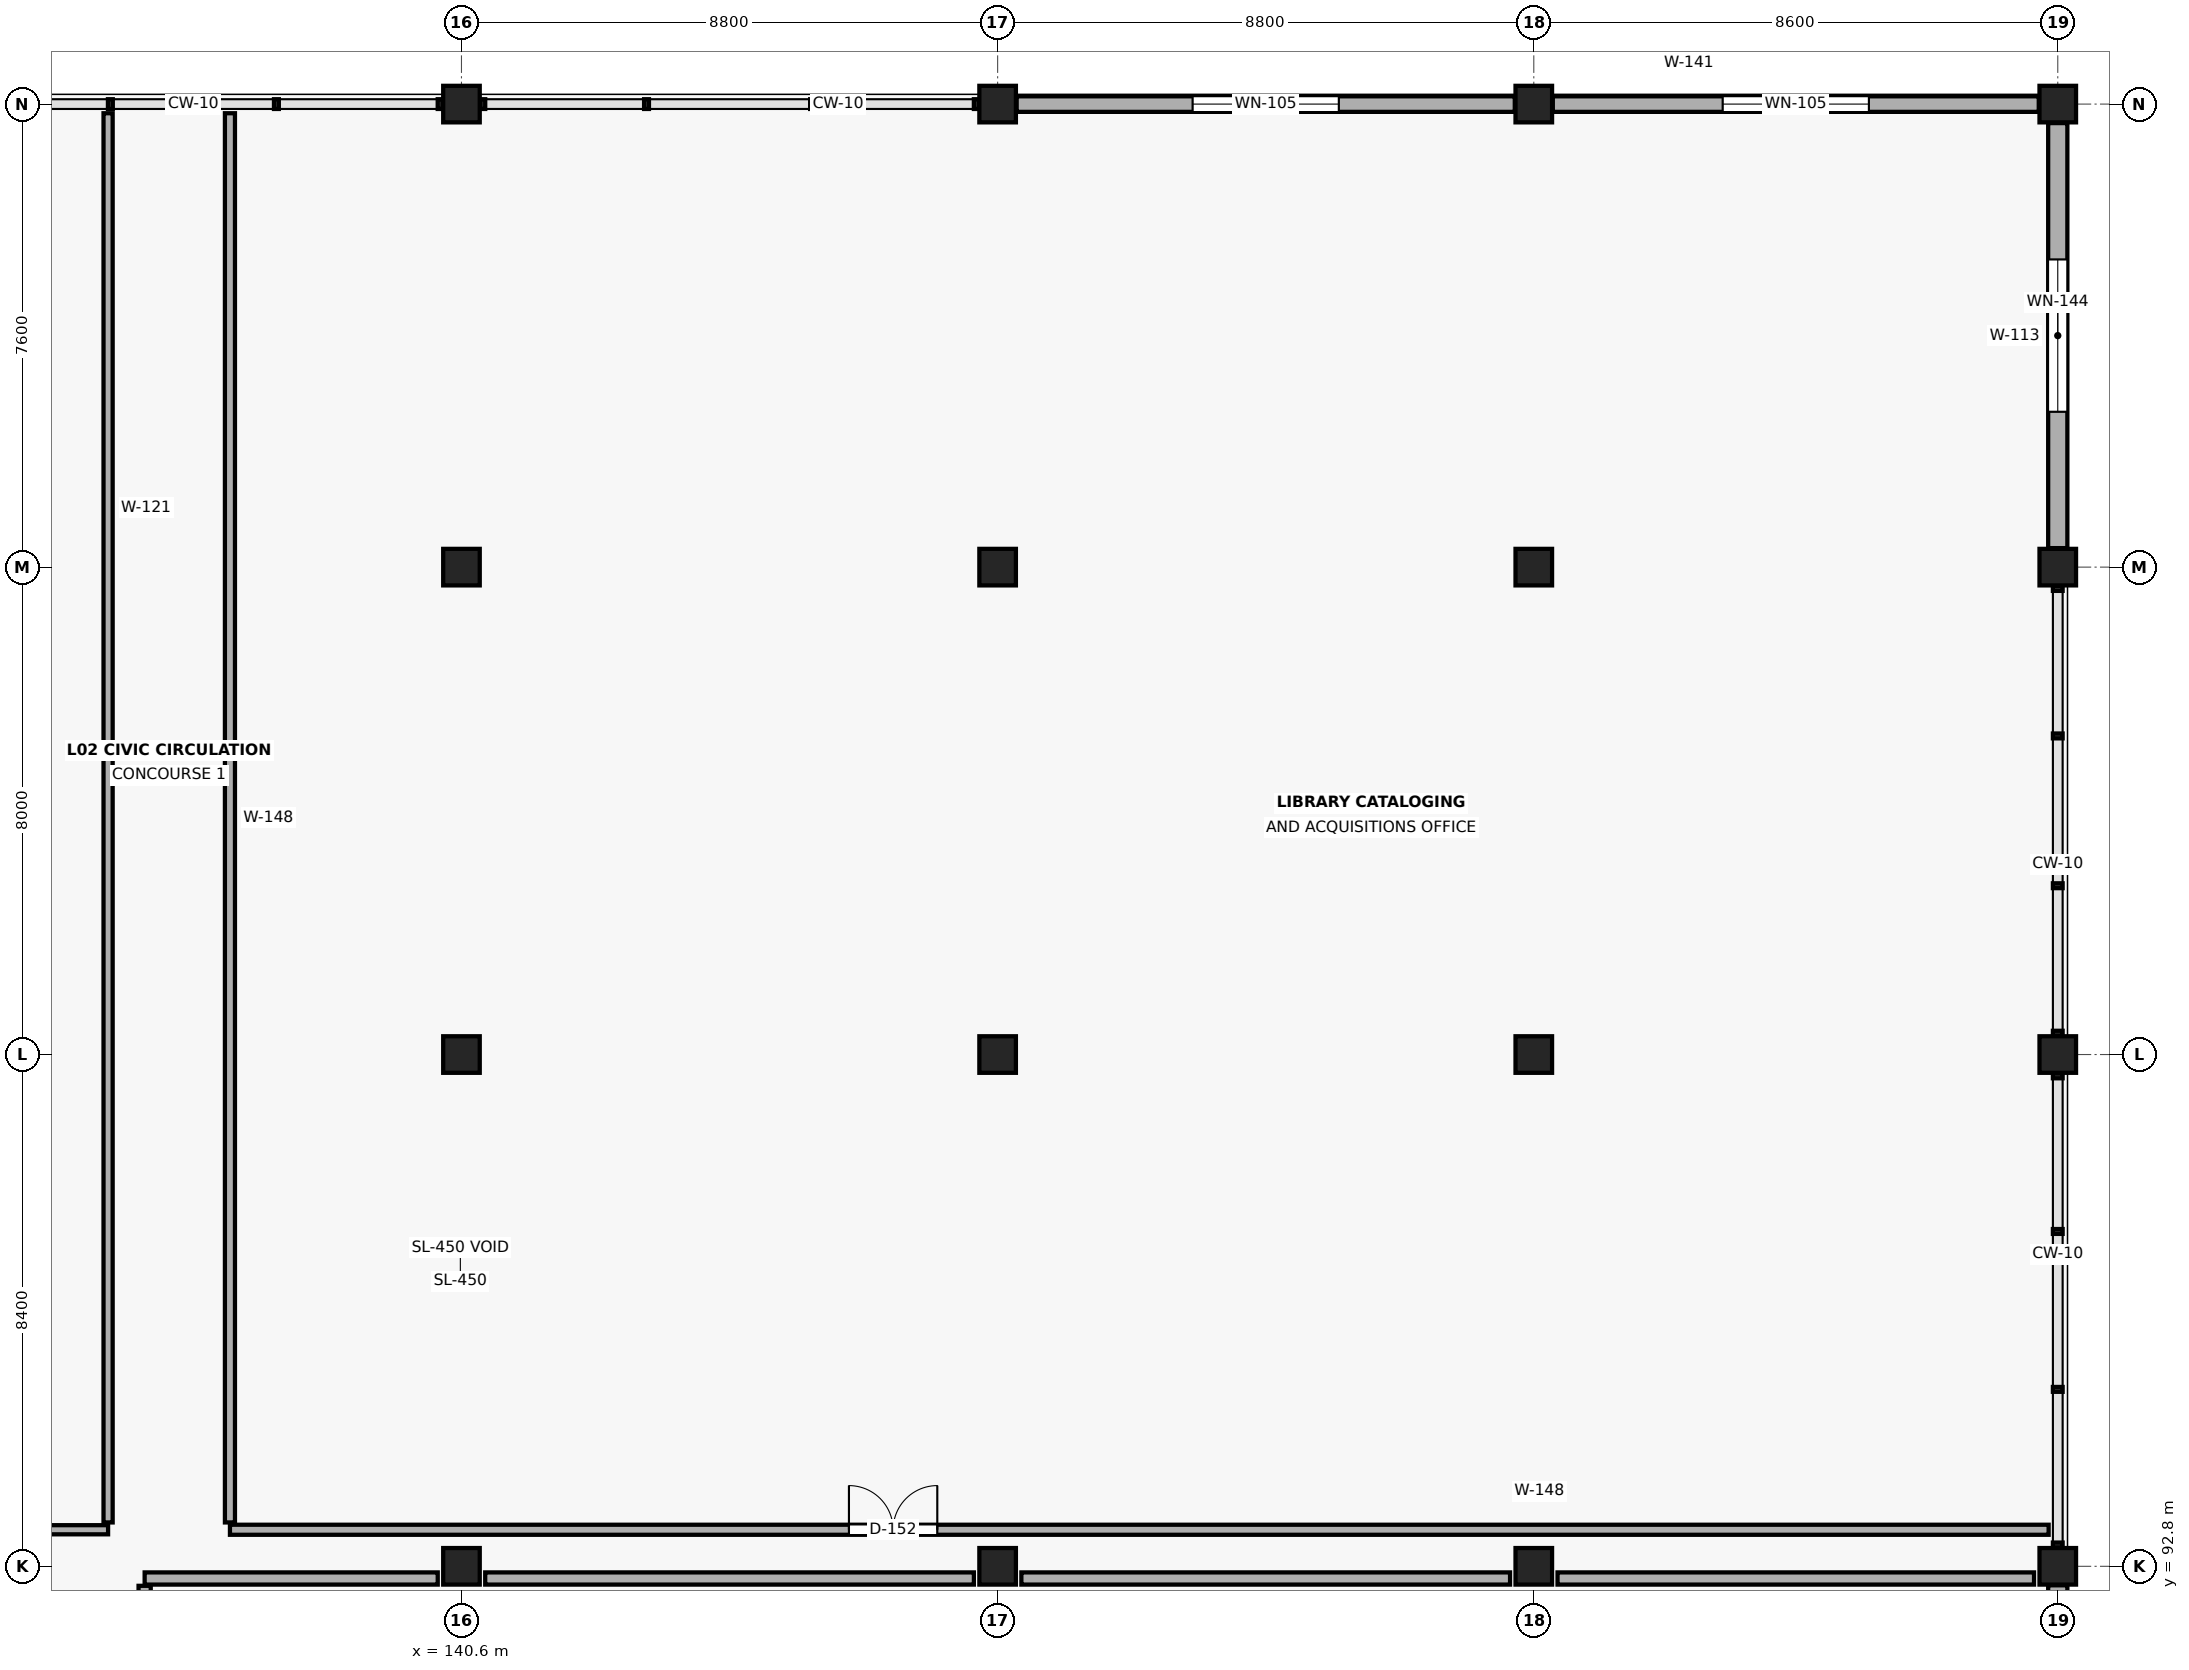
"""IFC4 building model, lengths in metres.
Left out: names, types, materials, properties, quantities, classifications, styles, units other than length and angle.
Written with IfcOpenShell. Run it as: python <this file> out.ifc"""

import sys

from ifc_helpers import new_model, si_unit, direction, frame, frame_2d, origin, origin_2d, place, context, subcontext, project, spatial, rectangle, extrude, element, fill, save


model = new_model("IFC4")
c1 = context("Model", 3, precision=1e-05, world=origin(), true_north=direction((0.0, 1.0)))
c2 = subcontext(c1, "Body", "Model", "MODEL_VIEW")
j1 = project(units=[si_unit("LENGTHUNIT", "METRE"), si_unit("PLANEANGLEUNIT", "RADIAN")], contexts=[c1])
p1 = place(None, origin())
s1 = spatial("IfcSite", under=j1, at=p1, CompositionType="ELEMENT")
p2 = place(p1, origin())
s2 = spatial("IfcBuilding", under=s1, at=p2, CompositionType="ELEMENT")
p3 = place(p2, frame((0.0, 0.0, 9.9)))
s3 = spatial("IfcBuildingStorey", under=s2, at=p3, CompositionType="ELEMENT", Elevation=9.9)
for number, where, z_axis, x_axis in (
    (1, (140.6, 92.8, 0.0), (0.0, 0.0, 1.0), (1.0, 0.0, 0.0)),
    (2, (140.6, 101.2, 0.0), (0.0, 0.0, 1.0), (1.0, 0.0, 0.0)),
    (3, (140.6, 109.2, 0.0), (0.0, 0.0, 1.0), (1.0, 0.0, 0.0)),
    (4, (140.6, 116.8, 0.0), (0.0, 0.0, 1.0), (1.0, 0.0, 0.0)),
    (5, (149.4, 92.8, 0.0), (0.0, 0.0, 1.0), (1.0, 0.0, 0.0)),
    (6, (149.4, 101.2, 0.0), (0.0, 0.0, 1.0), (1.0, 0.0, 0.0)),
    (7, (149.4, 109.2, 0.0), (0.0, 0.0, 1.0), (1.0, 0.0, 0.0)),
    (8, (149.4, 116.8, 0.0), (0.0, 0.0, 1.0), (1.0, 0.0, 0.0)),
    (9, (158.2, 92.8, 0.0), (0.0, 0.0, 1.0), (1.0, 0.0, 0.0)),
    (10, (158.2, 101.2, 0.0), (0.0, 0.0, 1.0), (1.0, 0.0, 0.0)),
    (11, (158.2, 109.2, 0.0), (0.0, 0.0, 1.0), (1.0, 0.0, 0.0)),
    (12, (158.2, 116.8, 0.0), (0.0, 0.0, 1.0), (1.0, 0.0, 0.0)),
    (13, (166.8, 92.8, 0.0), (0.0, 0.0, 1.0), (1.0, 0.0, 0.0)),
    (14, (166.8, 101.2, 0.0), (0.0, 0.0, 1.0), (1.0, 0.0, 0.0)),
    (15, (166.8, 109.2, 0.0), (0.0, 0.0, 1.0), (1.0, 0.0, 0.0)),
    (16, (166.8, 116.8, 0.0), (0.0, 0.0, 1.0), (1.0, 0.0, 0.0)),
):
    element("IfcColumn", number, at=place(p3, frame(where, z_axis=z_axis, x_axis=x_axis)), inside=s3, PredefinedType="COLUMN", context=c2, shape_type="SweptSolid", body=[
        extrude(rectangle(XDim=0.6, YDim=0.6, at=origin_2d()), origin(), (0.0, 0.0, 1.0), 4.5),
    ])
p4 = place(p3, frame((149.712, 116.8, 0.0), z_axis=(0.0, 0.0, 1.0), x_axis=(1.0, 0.0, 0.0)))
e17 = element("IfcWall", 17, at=p4, inside=s3, PredefinedType="SOLIDWALL", context=c2, shape_type="SweptSolid", body=[
    extrude(rectangle(XDim=8.176, YDim=0.255, at=frame_2d((4.088, 0.0))), origin(), (0.0, 0.0, 1.0), 3.395),
])
p5 = place(p4, frame((2.888, 0.0, 0.85)))
e18 = element("IfcOpeningElement", 18, at=p5, cuts=e17, PredefinedType="OPENING", context=c2, shape_type="SweptSolid", body=[
    extrude(rectangle(XDim=2.4, YDim=2.4, at=frame_2d((1.2, 1.2))), frame((0.0, 0.139, 0.0), z_axis=(0.0, -1.0, 0.0), x_axis=(1.0, 0.0, 0.0)), (0.0, 0.0, 1.0), 0.279),
])
p6 = place(p3, frame((158.512, 116.8, 0.0), z_axis=(0.0, 0.0, 1.0), x_axis=(1.0, 0.0, 0.0)))
e19 = element("IfcWall", 19, at=p6, inside=s3, PredefinedType="SOLIDWALL", context=c2, shape_type="SweptSolid", body=[
    extrude(rectangle(XDim=7.976, YDim=0.255, at=frame_2d((3.988, 0.0))), origin(), (0.0, 0.0, 1.0), 3.395),
])
p7 = place(p6, frame((2.788, 0.0, 0.85)))
e20 = element("IfcOpeningElement", 20, at=p7, cuts=e19, PredefinedType="OPENING", context=c2, shape_type="SweptSolid", body=[
    extrude(rectangle(XDim=2.4, YDim=2.4, at=frame_2d((1.2, 1.2))), frame((0.0, 0.139, 0.0), z_axis=(0.0, -1.0, 0.0), x_axis=(1.0, 0.0, 0.0)), (0.0, 0.0, 1.0), 0.279),
])
p8 = place(p3, frame((166.8, 92.488, 0.0), z_axis=(0.0, 0.0, 1.0), x_axis=(0.0, -1.0, 0.0)))
e21 = element("IfcWall", 21, at=p8, inside=s3, PredefinedType="SOLIDWALL", context=c2, shape_type="SweptSolid", body=[
    extrude(rectangle(XDim=8.126, YDim=0.315, at=frame_2d((4.063, 0.0))), origin(), (0.0, 0.0, 1.0), 3.395),
])
p9 = place(p8, frame((2.813, 0.0, 0.85)))
e22 = element("IfcOpeningElement", 22, at=p9, cuts=e21, PredefinedType="OPENING", context=c2, shape_type="SweptSolid", body=[
    extrude(rectangle(XDim=2.5, YDim=2.4, at=frame_2d((1.25, 1.2))), frame((0.0, 0.169, 0.0), z_axis=(0.0, -1.0, 0.0), x_axis=(1.0, 0.0, 0.0)), (0.0, 0.0, 1.0), 0.339),
])
p10 = place(p3, frame((166.8, 116.488, 0.0), z_axis=(0.0, 0.0, 1.0), x_axis=(0.0, -1.0, 0.0)))
e23 = element("IfcWall", 23, at=p10, inside=s3, PredefinedType="SOLIDWALL", context=c2, shape_type="SweptSolid", body=[
    extrude(rectangle(XDim=6.976, YDim=0.315, at=frame_2d((3.488, 0.0))), origin(), (0.0, 0.0, 1.0), 3.395),
])
p11 = place(p10, frame((2.238, 0.0, 0.85)))
e24 = element("IfcOpeningElement", 24, at=p11, cuts=e23, PredefinedType="OPENING", context=c2, shape_type="SweptSolid", body=[
    extrude(rectangle(XDim=2.5, YDim=2.4, at=frame_2d((1.25, 1.2))), frame((0.0, 0.169, 0.0), z_axis=(0.0, -1.0, 0.0), x_axis=(1.0, 0.0, 0.0)), (0.0, 0.0, 1.0), 0.339),
])
p12 = place(p3, frame((166.41, 92.6, 0.0), z_axis=(0.0, 0.0, 1.0), x_axis=(-1.0, 0.0, 0.0)))
e25 = element("IfcWall", 25, at=p12, inside=s3, PredefinedType="STANDARD", context=c2, shape_type="SweptSolid", body=[
    extrude(rectangle(XDim=7.821, YDim=0.2, at=frame_2d((3.91, 0.0))), origin(), (0.0, 0.0, 1.0), 3.455),
])
p13 = place(p3, frame((157.81, 92.6, 0.0), z_axis=(0.0, 0.0, 1.0), x_axis=(-1.0, 0.0, 0.0)))
e26 = element("IfcWall", 26, at=p13, inside=s3, PredefinedType="STANDARD", context=c2, shape_type="SweptSolid", body=[
    extrude(rectangle(XDim=8.021, YDim=0.2, at=frame_2d((4.01, 0.0))), origin(), (0.0, 0.0, 1.0), 3.455),
])
p14 = place(p3, frame((149.01, 92.6, 0.0), z_axis=(0.0, 0.0, 1.0), x_axis=(-1.0, 0.0, 0.0)))
e27 = element("IfcWall", 27, at=p14, inside=s3, PredefinedType="STANDARD", context=c2, shape_type="SweptSolid", body=[
    extrude(rectangle(XDim=8.021, YDim=0.2, at=frame_2d((4.01, 0.0))), origin(), (0.0, 0.0, 1.0), 3.455),
])
p15 = place(p3, frame((140.21, 92.6, 0.0), z_axis=(0.0, 0.0, 1.0), x_axis=(-1.0, 0.0, 0.0)))
e28 = element("IfcWall", 28, at=p15, inside=s3, PredefinedType="STANDARD", context=c2, shape_type="SweptSolid", body=[
    extrude(rectangle(XDim=4.811, YDim=0.2, at=frame_2d((2.405, 0.0))), origin(), (0.0, 0.0, 1.0), 3.455),
])
p16 = place(p3, frame((135.4, 64.72, 0.0), z_axis=(0.0, 0.0, 1.0), x_axis=(0.0, 1.0, 0.0)))
e29 = element("IfcWall", 29, at=p16, inside=s3, PredefinedType="STANDARD", context=c2, shape_type="SweptSolid", body=[
    extrude(rectangle(XDim=27.76, YDim=0.2, at=frame_2d((13.88, 0.0))), origin(), (0.0, 0.0, 1.0), 4.255),
])
p17 = place(p16, frame((9.23, 0.0, 0.0)))
e30 = element("IfcOpeningElement", 30, at=p17, cuts=e29, PredefinedType="OPENING", context=c2, shape_type="SweptSolid", body=[
    extrude(rectangle(XDim=1.6, YDim=2.25, at=frame_2d((0.8, 1.125))), frame((0.0, 0.112, 0.0), z_axis=(0.0, -1.0, 0.0), x_axis=(1.0, 0.0, 0.0)), (0.0, 0.0, 1.0), 0.224),
])
p18 = place(p3, frame((105.2, 93.4, 0.0), z_axis=(0.0, 0.0, 1.0), x_axis=(1.0, 0.0, 0.0)))
e31 = element("IfcWall", 31, at=p18, inside=s3, PredefinedType="PARTITIONING", context=c2, shape_type="SweptSolid", body=[
    extrude(rectangle(XDim=29.6, YDim=0.15, at=frame_2d((14.8, 0.0))), origin(), (0.0, 0.0, 1.0), 4.255),
])
p19 = place(p18, frame((10.41, 0.0, 0.0)))
e32 = element("IfcOpeningElement", 32, at=p19, cuts=e31, PredefinedType="OPENING", context=c2, shape_type="SweptSolid", body=[
    extrude(rectangle(XDim=1.55, YDim=2.35, at=frame_2d((0.775, 1.175))), frame((0.0, 0.087, 0.0), z_axis=(0.0, -1.0, 0.0), x_axis=(1.0, 0.0, 0.0)), (0.0, 0.0, 1.0), 0.174),
])
p20 = place(p3, frame((134.8, 93.52, 0.0), z_axis=(0.0, 0.0, 1.0), x_axis=(0.0, 1.0, 0.0)))
e33 = element("IfcWall", 33, at=p20, inside=s3, PredefinedType="PARTITIONING", context=c2, shape_type="SweptSolid", body=[
    extrude(rectangle(XDim=23.13, YDim=0.15, at=frame_2d((11.565, 0.0))), origin(), (0.0, 0.0, 1.0), 4.255),
])
p21 = place(p3, frame((136.8, 93.4, 0.0), z_axis=(0.0, 0.0, 1.0), x_axis=(1.0, 0.0, 0.0)))
e34 = element("IfcWall", 34, at=p21, inside=s3, PredefinedType="PARTITIONING", context=c2, shape_type="SweptSolid", body=[
    extrude(rectangle(XDim=29.85, YDim=0.165, at=frame_2d((14.925, 0.0))), origin(), (0.0, 0.0, 1.0), 4.255),
])
p22 = place(p21, frame((10.16, 0.0, 0.0)))
e35 = element("IfcOpeningElement", 35, at=p22, cuts=e34, PredefinedType="OPENING", context=c2, shape_type="SweptSolid", body=[
    extrude(rectangle(XDim=1.45, YDim=2.35, at=frame_2d((0.725, 1.175))), frame((0.0, 0.094, 0.0), z_axis=(0.0, -1.0, 0.0), x_axis=(1.0, 0.0, 0.0)), (0.0, 0.0, 1.0), 0.189),
])
p23 = place(p3, frame((136.8, 116.65, 0.0), z_axis=(0.0, 0.0, 1.0), x_axis=(0.0, -1.0, 0.0)))
e36 = element("IfcWall", 36, at=p23, inside=s3, PredefinedType="PARTITIONING", context=c2, shape_type="SweptSolid", body=[
    extrude(rectangle(XDim=23.13, YDim=0.165, at=frame_2d((11.565, 0.0))), origin(), (0.0, 0.0, 1.0), 4.255),
])
p24 = place(p5, origin())
e37 = element("IfcWindow", 37, at=p24, inside=s3, PartitioningType="SINGLE_PANEL", PredefinedType="WINDOW", context=c2, shape_type="SweptSolid", body=[
    extrude(rectangle(XDim=2.4, YDim=2.4, at=frame_2d((1.2, 1.2))), frame((0.0, 0.03, 0.0), z_axis=(0.0, -1.0, 0.0), x_axis=(1.0, 0.0, 0.0)), (0.0, 0.0, 1.0), 0.06),
])
fill(e18, e37)
p25 = place(p7, origin())
e38 = element("IfcWindow", 38, at=p25, inside=s3, PartitioningType="SINGLE_PANEL", PredefinedType="WINDOW", context=c2, shape_type="SweptSolid", body=[
    extrude(rectangle(XDim=2.4, YDim=2.4, at=frame_2d((1.2, 1.2))), frame((0.0, 0.03, 0.0), z_axis=(0.0, -1.0, 0.0), x_axis=(1.0, 0.0, 0.0)), (0.0, 0.0, 1.0), 0.06),
])
fill(e20, e38)
p26 = place(p11, origin())
e39 = element("IfcWindow", 39, at=p26, inside=s3, PartitioningType="SINGLE_PANEL", PredefinedType="WINDOW", context=c2, shape_type="SweptSolid", body=[
    extrude(rectangle(XDim=2.5, YDim=2.4, at=frame_2d((1.25, 1.2))), frame((0.0, 0.03, 0.0), z_axis=(0.0, -1.0, 0.0), x_axis=(1.0, 0.0, 0.0)), (0.0, 0.0, 1.0), 0.06),
])
fill(e24, e39)
p27 = place(p22, origin())
e40 = element("IfcDoor", 40, at=p27, inside=s3, OperationType="DOUBLE_DOOR_SINGLE_SWING", PredefinedType="DOOR", context=c2, shape_type="SweptSolid", body=[
    extrude(rectangle(XDim=1.45, YDim=2.35, at=frame_2d((0.725, 1.175))), frame((0.0, 0.025, 0.0), z_axis=(0.0, -1.0, 0.0), x_axis=(1.0, 0.0, 0.0)), (0.0, 0.0, 1.0), 0.05),
])
fill(e35, e40)
save(model, sys.argv[1])
